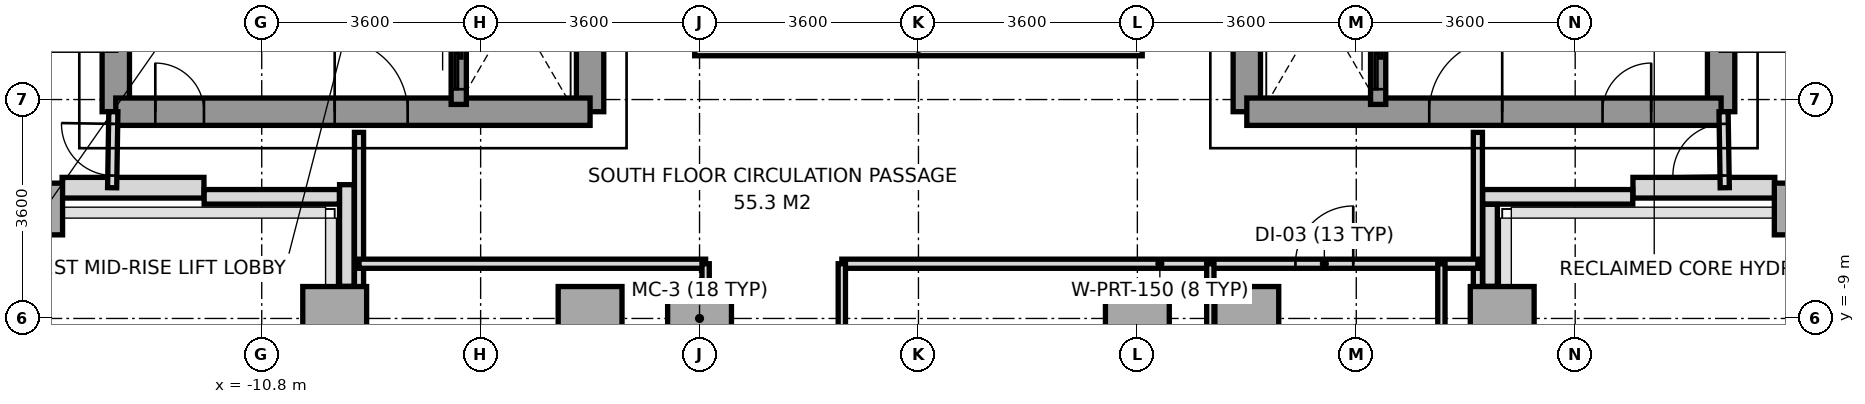
"""IFC4 building model, lengths in metres.
Left out: names, types, materials, properties, quantities, classifications, styles, units other than length and angle.
Written with IfcOpenShell. Run it as: python <this file> out.ifc"""

import sys

from ifc_helpers import new_model, si_unit, direction, frame, frame_2d, origin, origin_2d, place, context, subcontext, project, spatial, rectangle, extrude, source, transform, mapped, element, fill, save


model = new_model("IFC4")
c1 = context("Model", 3, precision=1e-05, world=origin(), true_north=direction((0.0, 1.0)))
c2 = subcontext(c1, "Body", "Model", "MODEL_VIEW")
j1 = project(units=[si_unit("LENGTHUNIT", "METRE"), si_unit("PLANEANGLEUNIT", "RADIAN")], contexts=[c1])
p1 = place(None, origin())
s1 = spatial("IfcSite", under=j1, at=p1, CompositionType="ELEMENT")
p2 = place(p1, origin())
s2 = spatial("IfcBuilding", under=s1, at=p2, CompositionType="ELEMENT")
p3 = place(p2, frame((0.0, 0.0, 117.6)))
s3 = spatial("IfcBuildingStorey", under=s2, at=p3, CompositionType="ELEMENT", Elevation=117.6)
m1 = source(origin(), c2, "Body", "SweptSolid", [
    extrude(rectangle(XDim=0.65, YDim=0.85, at=origin_2d()), origin(), (0.0, 0.0, 1.0), 3.2),
])
p4 = place(p3, frame((-14.4, -7.2, 0.0), z_axis=(0.0, 0.0, 1.0), x_axis=(1.0, 0.0, 0.0)))
e1 = element("IfcColumn", 1, at=p4, inside=s3, PredefinedType="COLUMN", context=c2, shape_type="MappedRepresentation", body=[
    mapped(m1, transform((0.0, 0.0, 0.0), x_axis=(1.0, 0.0, 0.0), y_axis=(0.0, 1.0, 0.0), z_axis=(0.0, 0.0, 1.0), scale=1.0)),
])
m2 = source(origin(), c2, "Body", "SweptSolid", [
    extrude(rectangle(XDim=1.05, YDim=1.05, at=origin_2d()), origin(), (0.0, 0.0, 1.0), 3.2),
])
for number, where, z_axis, x_axis in (
    (2, (-9.6, -9.0, 0.0), (0.0, 0.0, 1.0), (1.0, 0.0, 0.0)),
    (3, (-5.4, -9.0, 0.0), (0.0, 0.0, 1.0), (1.0, 0.0, 0.0)),
    (4, (-3.6, -9.0, 0.0), (0.0, 0.0, 1.0), (1.0, 0.0, 0.0)),
    (5, (3.6, -9.0, 0.0), (0.0, 0.0, 1.0), (1.0, 0.0, 0.0)),
    (6, (5.4, -9.0, 0.0), (0.0, 0.0, 1.0), (1.0, 0.0, 0.0)),
    (7, (9.6, -9.0, 0.0), (0.0, 0.0, 1.0), (1.0, 0.0, 0.0)),
):
    element("IfcColumn", number, at=place(p3, frame(where, z_axis=z_axis, x_axis=x_axis)), inside=s3, PredefinedType="COLUMN", context=c2, shape_type="MappedRepresentation", body=[
        mapped(m2, transform((0.0, 0.0, 0.0), x_axis=(1.0, 0.0, 0.0), y_axis=(0.0, 1.0, 0.0), z_axis=(0.0, 0.0, 1.0), scale=1.0)),
    ])
p5 = place(p3, frame((14.4, -7.2, 0.0), z_axis=(0.0, 0.0, 1.0), x_axis=(1.0, 0.0, 0.0)))
e8 = element("IfcColumn", 8, at=p5, inside=s3, PredefinedType="COLUMN", context=c2, shape_type="MappedRepresentation", body=[
    mapped(m1, transform((0.0, 0.0, 0.0), x_axis=(1.0, 0.0, 0.0), y_axis=(0.0, 1.0, 0.0), z_axis=(0.0, 0.0, 1.0), scale=1.0)),
])
for number, where, z_axis, x_axis in (
    (9, (-14.083, -6.85, 0.0), (0.0, 0.0, 1.0), (1.0, 0.0, 0.0)),
    (10, (11.75, -6.85, 0.0), (0.0, 0.0, 1.0), (1.0, 0.0, 0.0)),
):
    element("IfcWall", number, at=place(p3, frame(where, z_axis=z_axis, x_axis=x_axis)), inside=s3, PredefinedType="SOLIDWALL", context=c2, shape_type="SweptSolid", body=[
        extrude(rectangle(XDim=2.333, YDim=0.34, at=frame_2d((1.167, 0.0))), origin(), (0.0, 0.0, 1.0), 3.2),
    ])
p6 = place(p3, frame((11.747, -7.0, 0.0), z_axis=(0.0, 0.0, 1.0), x_axis=(-1.0, 0.0, 0.0)))
e11 = element("IfcWall", 11, at=p6, inside=s3, PredefinedType="PARAPET", context=c2, shape_type="SweptSolid", body=[
    extrude(rectangle(XDim=2.469, YDim=0.24, at=frame_2d((1.234, 0.0))), origin(), (0.0, 0.0, 1.0), 1.15),
])
p7 = place(p3, frame((9.4, -7.123, 0.0), z_axis=(0.0, 0.0, 1.0), x_axis=(0.0, -1.0, 0.0)))
e12 = element("IfcWall", 12, at=p7, inside=s3, PredefinedType="PARAPET", context=c2, shape_type="SweptSolid", body=[
    extrude(rectangle(XDim=1.349, YDim=0.24, at=frame_2d((0.674, 0.0))), origin(), (0.0, 0.0, 1.0), 1.15),
])
p8 = place(p3, frame((-9.4, -8.472, 0.0), z_axis=(0.0, 0.0, 1.0), x_axis=(0.0, 1.0, 0.0)))
e13 = element("IfcWall", 13, at=p8, inside=s3, PredefinedType="PARAPET", context=c2, shape_type="SweptSolid", body=[
    extrude(rectangle(XDim=1.672, YDim=0.24, at=frame_2d((0.836, 0.0))), origin(), (0.0, 0.0, 1.0), 1.15),
])
p9 = place(p3, frame((-9.523, -7.0, 0.0), z_axis=(0.0, 0.0, 1.0), x_axis=(-1.0, 0.0, 0.0)))
e14 = element("IfcWall", 14, at=p9, inside=s3, PredefinedType="PARAPET", context=c2, shape_type="SweptSolid", body=[
    extrude(rectangle(XDim=2.224, YDim=0.24, at=frame_2d((1.112, 0.0))), origin(), (0.0, 0.0, 1.0), 1.15),
])
p10 = place(p3, frame((-13.2, -5.6, 0.0), z_axis=(0.0, 0.0, 1.0), x_axis=(0.0, 1.0, 0.0)))
e15 = element("IfcWall", 15, at=p10, inside=s3, PredefinedType="SHEAR", context=c2, shape_type="SweptSolid", body=[
    extrude(rectangle(XDim=11.2, YDim=0.45, at=frame_2d((5.6, 0.0))), origin(), (0.0, 0.0, 1.0), 3.2),
])
p11 = place(p3, frame((-5.4, -5.6, 0.0), z_axis=(0.0, 0.0, 1.0), x_axis=(0.0, 1.0, 0.0)))
e16 = element("IfcWall", 16, at=p11, inside=s3, PredefinedType="SHEAR", context=c2, shape_type="SweptSolid", body=[
    extrude(rectangle(XDim=12.5, YDim=0.45, at=frame_2d((6.25, 0.0))), origin(), (0.0, 0.0, 1.0), 3.2),
])
p12 = place(p11, frame((4.55, 0.0, 0.0)))
e17 = element("IfcOpeningElement", 17, at=p12, cuts=e16, PredefinedType="OPENING", context=c2, shape_type="SweptSolid", body=[
    extrude(rectangle(XDim=1.2, YDim=2.2, at=frame_2d((0.6, 1.1))), frame((0.0, 0.235, 0.0), z_axis=(0.0, -1.0, 0.0), x_axis=(1.0, 0.0, 0.0)), (0.0, 0.0, 1.0), 0.47),
])
p13 = place(p11, frame((6.86, 0.0, 0.0)))
e18 = element("IfcOpeningElement", 18, at=p13, cuts=e16, PredefinedType="OPENING", context=c2, shape_type="SweptSolid", body=[
    extrude(rectangle(XDim=0.8, YDim=2.1, at=frame_2d((0.4, 1.05))), frame((0.0, 0.235, 0.0), z_axis=(0.0, -1.0, 0.0), x_axis=(1.0, 0.0, 0.0)), (0.0, 0.0, 1.0), 0.47),
])
p14 = place(p11, frame((7.88, 0.0, 0.0)))
e19 = element("IfcOpeningElement", 19, at=p14, cuts=e16, PredefinedType="OPENING", context=c2, shape_type="SweptSolid", body=[
    extrude(rectangle(XDim=0.8, YDim=2.1, at=frame_2d((0.4, 1.05))), frame((0.0, 0.235, 0.0), z_axis=(0.0, -1.0, 0.0), x_axis=(1.0, 0.0, 0.0)), (0.0, 0.0, 1.0), 0.47),
])
p15 = place(p3, frame((-13.2, -5.6, 0.0), z_axis=(0.0, 0.0, 1.0), x_axis=(1.0, 0.0, 0.0)))
e20 = element("IfcWall", 20, at=p15, inside=s3, PredefinedType="SHEAR", context=c2, shape_type="SweptSolid", body=[
    extrude(rectangle(XDim=7.8, YDim=0.45, at=frame_2d((3.9, 0.0))), origin(), (0.0, 0.0, 1.0), 3.2),
])
p16 = place(p15, frame((3.6, 0.0, 0.0)))
e21 = element("IfcOpeningElement", 21, at=p16, cuts=e20, PredefinedType="OPENING", context=c2, shape_type="SweptSolid", body=[
    extrude(rectangle(XDim=1.2, YDim=2.2, at=frame_2d((0.6, 1.1))), frame((0.0, 0.235, 0.0), z_axis=(0.0, -1.0, 0.0), x_axis=(1.0, 0.0, 0.0)), (0.0, 0.0, 1.0), 0.47),
])
p17 = place(p15, frame((0.65, 0.0, 0.0)))
e22 = element("IfcOpeningElement", 22, at=p17, cuts=e20, PredefinedType="OPENING", context=c2, shape_type="SweptSolid", body=[
    extrude(rectangle(XDim=0.8, YDim=2.1, at=frame_2d((0.4, 1.05))), frame((0.0, 0.235, 0.0), z_axis=(0.0, -1.0, 0.0), x_axis=(1.0, 0.0, 0.0)), (0.0, 0.0, 1.0), 0.47),
])
p18 = place(p3, frame((13.2, -5.6, 0.0), z_axis=(0.0, 0.0, 1.0), x_axis=(0.0, 1.0, 0.0)))
e23 = element("IfcWall", 23, at=p18, inside=s3, PredefinedType="SHEAR", context=c2, shape_type="SweptSolid", body=[
    extrude(rectangle(XDim=11.2, YDim=0.45, at=frame_2d((5.6, 0.0))), origin(), (0.0, 0.0, 1.0), 3.2),
])
p19 = place(p3, frame((5.4, -5.6, 0.0), z_axis=(0.0, 0.0, 1.0), x_axis=(0.0, 1.0, 0.0)))
e24 = element("IfcWall", 24, at=p19, inside=s3, PredefinedType="SHEAR", context=c2, shape_type="SweptSolid", body=[
    extrude(rectangle(XDim=12.5, YDim=0.45, at=frame_2d((6.25, 0.0))), origin(), (0.0, 0.0, 1.0), 3.2),
])
p20 = place(p19, frame((4.55, 0.0, 0.0)))
e25 = element("IfcOpeningElement", 25, at=p20, cuts=e24, PredefinedType="OPENING", context=c2, shape_type="SweptSolid", body=[
    extrude(rectangle(XDim=1.2, YDim=2.2, at=frame_2d((0.6, 1.1))), frame((0.0, 0.235, 0.0), z_axis=(0.0, -1.0, 0.0), x_axis=(1.0, 0.0, 0.0)), (0.0, 0.0, 1.0), 0.47),
])
p21 = place(p3, frame((5.4, -5.6, 0.0), z_axis=(0.0, 0.0, 1.0), x_axis=(1.0, 0.0, 0.0)))
e26 = element("IfcWall", 26, at=p21, inside=s3, PredefinedType="SHEAR", context=c2, shape_type="SweptSolid", body=[
    extrude(rectangle(XDim=7.8, YDim=0.45, at=frame_2d((3.9, 0.0))), origin(), (0.0, 0.0, 1.0), 3.2),
])
p22 = place(p21, frame((3.0, 0.0, 0.0)))
e27 = element("IfcOpeningElement", 27, at=p22, cuts=e26, PredefinedType="OPENING", context=c2, shape_type="SweptSolid", body=[
    extrude(rectangle(XDim=1.2, YDim=2.2, at=frame_2d((0.6, 1.1))), frame((0.0, 0.235, 0.0), z_axis=(0.0, -1.0, 0.0), x_axis=(1.0, 0.0, 0.0)), (0.0, 0.0, 1.0), 0.47),
])
p23 = place(p21, frame((5.85, 0.0, 0.0)))
e28 = element("IfcOpeningElement", 28, at=p23, cuts=e26, PredefinedType="OPENING", context=c2, shape_type="SweptSolid", body=[
    extrude(rectangle(XDim=0.8, YDim=2.1, at=frame_2d((0.4, 1.05))), frame((0.0, 0.235, 0.0), z_axis=(0.0, -1.0, 0.0), x_axis=(1.0, 0.0, 0.0)), (0.0, 0.0, 1.0), 0.47),
])
p24 = place(p3, frame((-7.56, -5.48, 0.0), z_axis=(0.0, 0.0, 1.0), x_axis=(0.0, 1.0, 0.0)))
e29 = element("IfcWall", 29, at=p24, inside=s3, PredefinedType="SOLIDWALL", context=c2, shape_type="SweptSolid", body=[
    extrude(rectangle(XDim=1.6, YDim=0.25, at=frame_2d((0.8, 0.0))), origin(), (0.0, 0.0, 1.0), 3.2),
])
p25 = place(p24, frame((0.25, 0.0, 0.0)))
e30 = element("IfcOpeningElement", 30, at=p25, cuts=e29, PredefinedType="OPENING", context=c2, shape_type="SweptSolid", body=[
    extrude(rectangle(XDim=1.1, YDim=2.2, at=frame_2d((0.55, 1.1))), frame((0.0, 0.135, 0.0), z_axis=(0.0, -1.0, 0.0), x_axis=(1.0, 0.0, 0.0)), (0.0, 0.0, 1.0), 0.27),
])
p26 = place(p3, frame((7.56, -5.48, 0.0), z_axis=(0.0, 0.0, 1.0), x_axis=(0.0, 1.0, 0.0)))
e31 = element("IfcWall", 31, at=p26, inside=s3, PredefinedType="SOLIDWALL", context=c2, shape_type="SweptSolid", body=[
    extrude(rectangle(XDim=1.6, YDim=0.25, at=frame_2d((0.8, 0.0))), origin(), (0.0, 0.0, 1.0), 3.2),
])
p27 = place(p26, frame((0.25, 0.0, 0.0)))
e32 = element("IfcOpeningElement", 32, at=p27, cuts=e31, PredefinedType="OPENING", context=c2, shape_type="SweptSolid", body=[
    extrude(rectangle(XDim=1.1, YDim=2.2, at=frame_2d((0.55, 1.1))), frame((0.0, 0.135, 0.0), z_axis=(0.0, -1.0, 0.0), x_axis=(1.0, 0.0, 0.0)), (0.0, 0.0, 1.0), 0.27),
])
for number, where, z_axis, x_axis in (
    (33, (-9.2, -15.68, 0.0), (0.0, 0.0, 1.0), (0.0, 1.0, 0.0)),
    (34, (9.2, -15.68, 0.0), (0.0, 0.0, 1.0), (0.0, 1.0, 0.0)),
):
    element("IfcWall", number, at=place(p3, frame(where, z_axis=z_axis, x_axis=x_axis)), inside=s3, PredefinedType="PARTITIONING", context=c2, shape_type="SweptSolid", body=[
        extrude(rectangle(XDim=9.74, YDim=0.15, at=frame_2d((4.87, 0.0))), origin(), (0.0, 0.0, 1.0), 2.7),
    ])
p28 = place(p3, frame((-9.2, -8.1, 0.0), z_axis=(0.0, 0.0, 1.0), x_axis=(1.0, 0.0, 0.0)))
e35 = element("IfcWall", 35, at=p28, inside=s3, PredefinedType="PARTITIONING", context=c2, shape_type="SweptSolid", body=[
    extrude(rectangle(XDim=5.7, YDim=0.15, at=frame_2d((2.85, 0.0))), origin(), (0.0, 0.0, 1.0), 2.76),
])
p29 = place(p3, frame((-1.26, -8.1, 0.0), z_axis=(0.0, 0.0, 1.0), x_axis=(1.0, 0.0, 0.0)))
e36 = element("IfcWall", 36, at=p29, inside=s3, PredefinedType="PARTITIONING", context=c2, shape_type="SweptSolid", body=[
    extrude(rectangle(XDim=10.46, YDim=0.15, at=frame_2d((5.23, 0.0))), origin(), (0.0, 0.0, 1.0), 2.76),
])
p30 = place(p29, frame((7.46, 0.0, 0.0)))
e37 = element("IfcOpeningElement", 37, at=p30, cuts=e36, PredefinedType="OPENING", context=c2, shape_type="SweptSolid", body=[
    extrude(rectangle(XDim=0.95, YDim=2.15, at=frame_2d((0.475, 1.075))), frame((0.0, 0.085, 0.0), z_axis=(0.0, -1.0, 0.0), x_axis=(1.0, 0.0, 0.0)), (0.0, 0.0, 1.0), 0.17),
])
p31 = place(p3, frame((-3.5, -16.05, 0.0), z_axis=(0.0, 0.0, 1.0), x_axis=(0.0, 1.0, 0.0)))
e38 = element("IfcWall", 38, at=p31, inside=s3, PredefinedType="PARTITIONING", context=c2, shape_type="SweptSolid", body=[
    extrude(rectangle(XDim=7.95, YDim=0.12, at=frame_2d((3.975, 0.0))), origin(), (0.0, 0.0, 1.0), 2.7),
])
p32 = place(p31, frame((1.2, 0.0, 0.0)))
e39 = element("IfcOpeningElement", 39, at=p32, cuts=e38, PredefinedType="OPENING", context=c2, shape_type="SweptSolid", body=[
    extrude(rectangle(XDim=0.95, YDim=2.15, at=frame_2d((0.475, 1.075))), frame((0.0, 0.07, 0.0), z_axis=(0.0, -1.0, 0.0), x_axis=(1.0, 0.0, 0.0)), (0.0, 0.0, 1.0), 0.14),
])
p33 = place(p3, frame((-1.26, -16.05, 0.0), z_axis=(0.0, 0.0, 1.0), x_axis=(0.0, 1.0, 0.0)))
e40 = element("IfcWall", 40, at=p33, inside=s3, PredefinedType="PARTITIONING", context=c2, shape_type="SweptSolid", body=[
    extrude(rectangle(XDim=7.95, YDim=0.12, at=frame_2d((3.975, 0.0))), origin(), (0.0, 0.0, 1.0), 2.7),
])
p34 = place(p33, frame((1.95, 0.0, 0.0)))
e41 = element("IfcOpeningElement", 41, at=p34, cuts=e40, PredefinedType="OPENING", context=c2, shape_type="SweptSolid", body=[
    extrude(rectangle(XDim=0.95, YDim=2.15, at=frame_2d((0.475, 1.075))), frame((0.0, 0.07, 0.0), z_axis=(0.0, -1.0, 0.0), x_axis=(1.0, 0.0, 0.0)), (0.0, 0.0, 1.0), 0.14),
])
p35 = place(p3, frame((4.8, -11.5, 0.0), z_axis=(0.0, 0.0, 1.0), x_axis=(0.0, 1.0, 0.0)))
e42 = element("IfcWall", 42, at=p35, inside=s3, PredefinedType="PARTITIONING", context=c2, shape_type="SweptSolid", body=[
    extrude(rectangle(XDim=3.4, YDim=0.12, at=frame_2d((1.7, 0.0))), origin(), (0.0, 0.0, 1.0), 3.2),
])
p36 = place(p3, frame((8.6, -11.5, 0.0), z_axis=(0.0, 0.0, 1.0), x_axis=(0.0, 1.0, 0.0)))
e43 = element("IfcWall", 43, at=p36, inside=s3, PredefinedType="PARTITIONING", context=c2, shape_type="SweptSolid", body=[
    extrude(rectangle(XDim=3.4, YDim=0.12, at=frame_2d((1.7, 0.0))), origin(), (0.0, 0.0, 1.0), 2.7),
])
p37 = place(p3, frame((-13.26, -6.85, 0.0), z_axis=(0.0, 0.0, 1.0), x_axis=(0.016013571389, 0.999871774545, 0.0)))
e44 = element("IfcWall", 44, at=p37, inside=s3, PredefinedType="PARTITIONING", context=c2, shape_type="SweptSolid", body=[
    extrude(rectangle(XDim=1.25, YDim=0.15, at=frame_2d((0.625, 0.0))), origin(), (0.0, 0.0, 1.0), 3.2),
])
p38 = place(p37, frame((0.2, 0.0, 0.0)))
e45 = element("IfcOpeningElement", 45, at=p38, cuts=e44, PredefinedType="OPENING", context=c2, shape_type="SweptSolid", body=[
    extrude(rectangle(XDim=0.85, YDim=2.1, at=frame_2d((0.425, 1.05))), frame((0.0, 0.085, 0.0), z_axis=(0.0, -1.0, 0.0), x_axis=(1.0, 0.0, 0.0)), (0.0, 0.0, 1.0), 0.17),
])
p39 = place(p3, frame((13.26, -6.85, 0.0), z_axis=(0.0, 0.0, 1.0), x_axis=(-0.016013571389, 0.999871774545, 0.0)))
e46 = element("IfcWall", 46, at=p39, inside=s3, PredefinedType="PARTITIONING", context=c2, shape_type="SweptSolid", body=[
    extrude(rectangle(XDim=1.25, YDim=0.15, at=frame_2d((0.625, 0.0))), origin(), (0.0, 0.0, 1.0), 3.2),
])
p40 = place(p39, frame((0.2, 0.0, 0.0)))
e47 = element("IfcOpeningElement", 47, at=p40, cuts=e46, PredefinedType="OPENING", context=c2, shape_type="SweptSolid", body=[
    extrude(rectangle(XDim=0.85, YDim=2.1, at=frame_2d((0.425, 1.05))), frame((0.0, 0.085, 0.0), z_axis=(0.0, -1.0, 0.0), x_axis=(1.0, 0.0, 0.0)), (0.0, 0.0, 1.0), 0.17),
])
p41 = place(p3, frame((-3.68, -4.56, 0.0), z_axis=(0.0, 0.0, 1.0), x_axis=(1.0, 0.0, 0.0)))
e48 = element("IfcWall", 48, at=p41, inside=s3, PredefinedType="PARAPET", context=c2, shape_type="SweptSolid", body=[
    extrude(rectangle(XDim=7.36, YDim=0.24, at=frame_2d((3.68, 0.0))), origin(), (0.0, 0.0, 1.0), 1.15),
])
m3 = source(origin(), c2, "Body", "SweptSolid", [
    extrude(rectangle(XDim=1.2, YDim=2.2, at=frame_2d((0.6, 1.1))), frame((0.0, 0.025, 0.0), z_axis=(0.0, -1.0, 0.0), x_axis=(1.0, 0.0, 0.0)), (0.0, 0.0, 1.0), 0.05),
])
p42 = place(p16, origin())
e49 = element("IfcDoor", 49, at=p42, inside=s3, OperationType="SINGLE_SWING_LEFT", PredefinedType="DOOR", context=c2, shape_type="MappedRepresentation", body=[
    mapped(m3, transform((0.0, 0.0, 0.0), x_axis=(1.0, 0.0, 0.0), y_axis=(0.0, 1.0, 0.0), z_axis=(0.0, 0.0, 1.0), scale=1.0)),
])
fill(e21, e49)
p43 = place(p22, origin())
e50 = element("IfcDoor", 50, at=p43, inside=s3, OperationType="SINGLE_SWING_RIGHT", PredefinedType="DOOR", context=c2, shape_type="MappedRepresentation", body=[
    mapped(m3, transform((0.0, 0.0, 0.0), x_axis=(1.0, 0.0, 0.0), y_axis=(0.0, 1.0, 0.0), z_axis=(0.0, 0.0, 1.0), scale=1.0)),
])
fill(e27, e50)
m4 = source(origin(), c2, "Body", "SweptSolid", [
    extrude(rectangle(XDim=0.8, YDim=2.1, at=frame_2d((0.4, 1.05))), frame((0.0, 0.025, 0.0), z_axis=(0.0, -1.0, 0.0), x_axis=(1.0, 0.0, 0.0)), (0.0, 0.0, 1.0), 0.05),
])
p44 = place(p17, origin())
e51 = element("IfcDoor", 51, at=p44, inside=s3, OperationType="SINGLE_SWING_LEFT", PredefinedType="DOOR", context=c2, shape_type="MappedRepresentation", body=[
    mapped(m4, transform((0.0, 0.0, 0.0), x_axis=(1.0, 0.0, 0.0), y_axis=(0.0, 1.0, 0.0), z_axis=(0.0, 0.0, 1.0), scale=1.0)),
])
fill(e22, e51)
p45 = place(p23, origin())
e52 = element("IfcDoor", 52, at=p45, inside=s3, OperationType="SINGLE_SWING_RIGHT", PredefinedType="DOOR", context=c2, shape_type="MappedRepresentation", body=[
    mapped(m4, transform((0.0, 0.0, 0.0), x_axis=(1.0, 0.0, 0.0), y_axis=(0.0, 1.0, 0.0), z_axis=(0.0, 0.0, 1.0), scale=1.0)),
])
fill(e28, e52)
m5 = source(origin(), c2, "Body", "SweptSolid", [
    extrude(rectangle(XDim=1.1, YDim=2.2, at=frame_2d((0.55, 1.1))), frame((0.0, 0.025, 0.0), z_axis=(0.0, -1.0, 0.0), x_axis=(1.0, 0.0, 0.0)), (0.0, 0.0, 1.0), 0.05),
])
p46 = place(p25, origin())
e53 = element("IfcDoor", 53, at=p46, inside=s3, OperationType="SLIDING_TO_LEFT", PredefinedType="DOOR", context=c2, shape_type="MappedRepresentation", body=[
    mapped(m5, transform((0.0, 0.0, 0.0), x_axis=(1.0, 0.0, 0.0), y_axis=(0.0, 1.0, 0.0), z_axis=(0.0, 0.0, 1.0), scale=1.0)),
])
fill(e30, e53)
p47 = place(p27, origin())
e54 = element("IfcDoor", 54, at=p47, inside=s3, OperationType="SLIDING_TO_LEFT", PredefinedType="DOOR", context=c2, shape_type="MappedRepresentation", body=[
    mapped(m5, transform((0.0, 0.0, 0.0), x_axis=(1.0, 0.0, 0.0), y_axis=(0.0, 1.0, 0.0), z_axis=(0.0, 0.0, 1.0), scale=1.0)),
])
fill(e32, e54)
m6 = source(origin(), c2, "Body", "SweptSolid", [
    extrude(rectangle(XDim=0.95, YDim=2.15, at=frame_2d((0.475, 1.075))), frame((0.0, 0.025, 0.0), z_axis=(0.0, -1.0, 0.0), x_axis=(1.0, 0.0, 0.0)), (0.0, 0.0, 1.0), 0.05),
])
p48 = place(p30, origin())
e55 = element("IfcDoor", 55, at=p48, inside=s3, OperationType="SINGLE_SWING_RIGHT", PredefinedType="DOOR", context=c2, shape_type="MappedRepresentation", body=[
    mapped(m6, transform((0.0, 0.0, 0.0), x_axis=(1.0, 0.0, 0.0), y_axis=(0.0, 1.0, 0.0), z_axis=(0.0, 0.0, 1.0), scale=1.0)),
])
fill(e37, e55)
m7 = source(origin(), c2, "Body", "SweptSolid", [
    extrude(rectangle(XDim=0.85, YDim=2.1, at=frame_2d((0.425, 1.05))), frame((0.0, 0.025, 0.0), z_axis=(0.0, -1.0, 0.0), x_axis=(1.0, 0.0, 0.0)), (0.0, 0.0, 1.0), 0.05),
])
p49 = place(p38, origin())
e56 = element("IfcDoor", 56, at=p49, inside=s3, OperationType="SINGLE_SWING_RIGHT", PredefinedType="DOOR", context=c2, shape_type="MappedRepresentation", body=[
    mapped(m7, transform((0.0, 0.0, 0.0), x_axis=(1.0, 0.0, 0.0), y_axis=(0.0, 1.0, 0.0), z_axis=(0.0, 0.0, 1.0), scale=1.0)),
])
fill(e45, e56)
p50 = place(p40, origin())
e57 = element("IfcDoor", 57, at=p50, inside=s3, OperationType="SINGLE_SWING_LEFT", PredefinedType="DOOR", context=c2, shape_type="MappedRepresentation", body=[
    mapped(m7, transform((0.0, 0.0, 0.0), x_axis=(1.0, 0.0, 0.0), y_axis=(0.0, 1.0, 0.0), z_axis=(0.0, 0.0, 1.0), scale=1.0)),
])
fill(e47, e57)
save(model, sys.argv[1])
